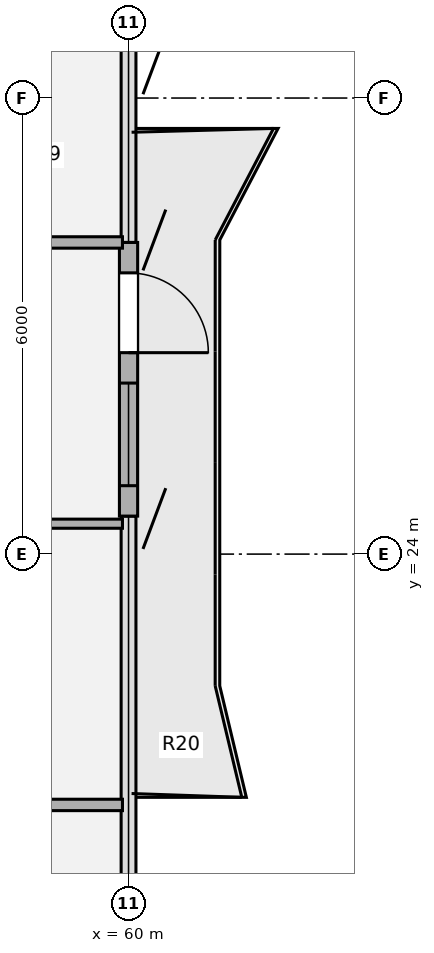
"""IFC4 building model, lengths in metres.
Left out: names, types, materials, properties, quantities, classifications, styles, units other than length and angle.
Written with IfcOpenShell. Run it as: python <this file> out.ifc"""

import sys

from ifc_helpers import new_model, si_unit, direction, frame, frame_2d, origin, origin_2d, place, context, subcontext, project, spatial, rectangle, extrude, source, transform, mapped, element, fill, save


model = new_model("IFC4")
c1 = context("Model", 3, precision=1e-05, world=origin(), true_north=direction((0.0, 1.0)))
c2 = subcontext(c1, "Body", "Model", "MODEL_VIEW")
j1 = project(units=[si_unit("LENGTHUNIT", "METRE"), si_unit("PLANEANGLEUNIT", "RADIAN")], contexts=[c1])
p1 = place(None, origin())
s1 = spatial("IfcSite", under=j1, at=p1, CompositionType="ELEMENT")
p2 = place(p1, origin())
s2 = spatial("IfcBuilding", under=s1, at=p2, CompositionType="ELEMENT")
p3 = place(p2, frame((0.0, 0.0, 34.56)))
s3 = spatial("IfcBuildingStorey", under=s2, at=p3, CompositionType="ELEMENT", Elevation=34.56)
p4 = place(p3, frame((60.0, 28.1, 0.0), z_axis=(0.0, 0.0, 1.0), x_axis=(0.0, -1.0, 0.0)))
e1 = element("IfcWall", 1, at=p4, inside=s3, PredefinedType="SOLIDWALL", context=c2, shape_type="SweptSolid", body=[
    extrude(rectangle(XDim=3.6, YDim=0.24, at=frame_2d((1.8, 0.0))), origin(), (0.0, 0.0, 1.0), 3.53),
])
p5 = place(p4, frame((0.4, 0.0, 0.0)))
e2 = element("IfcOpeningElement", 2, at=p5, cuts=e1, PredefinedType="OPENING", context=c2, shape_type="SweptSolid", body=[
    extrude(rectangle(XDim=1.05, YDim=2.15, at=origin_2d()), frame((0.525, 0.13, 1.075), z_axis=(0.0, -1.0, 0.0), x_axis=(1.0, 0.0, 0.0)), (0.0, 0.0, 1.0), 0.26),
])
p6 = place(p4, frame((1.85, 0.0, 0.85)))
e3 = element("IfcOpeningElement", 3, at=p6, cuts=e1, PredefinedType="OPENING", context=c2, shape_type="SweptSolid", body=[
    extrude(rectangle(XDim=1.35, YDim=1.35, at=origin_2d()), frame((0.675, 0.13, 0.675), z_axis=(0.0, -1.0, 0.0), x_axis=(1.0, 0.0, 0.0)), (0.0, 0.0, 1.0), 0.26),
])
p7 = place(p3, frame((49.9, 20.7, 0.0), z_axis=(0.0, 0.0, 1.0), x_axis=(1.0, 0.0, 0.0)))
e4 = element("IfcWall", 4, at=p7, inside=s3, PredefinedType="PARTITIONING", context=c2, shape_type="SweptSolid", body=[
    extrude(rectangle(XDim=10.02, YDim=0.15, at=frame_2d((5.01, 0.0))), origin(), (0.0, 0.0, 1.0), 2.982),
])
p8 = place(p3, frame((55.936, 24.4, 0.0), z_axis=(0.0, 0.0, 1.0), x_axis=(1.0, 0.0, 0.0)))
e5 = element("IfcWall", 5, at=p8, inside=s3, PredefinedType="PARTITIONING", context=c2, shape_type="SweptSolid", body=[
    extrude(rectangle(XDim=3.984, YDim=0.12, at=frame_2d((1.992, 0.0))), origin(), (0.0, 0.0, 1.0), 2.982),
])
p9 = place(p3, frame((49.9, 28.1, 0.0), z_axis=(0.0, 0.0, 1.0), x_axis=(1.0, 0.0, 0.0)))
e6 = element("IfcWall", 6, at=p9, inside=s3, PredefinedType="PARTITIONING", context=c2, shape_type="SweptSolid", body=[
    extrude(rectangle(XDim=10.02, YDim=0.15, at=frame_2d((5.01, 0.0))), origin(), (0.0, 0.0, 1.0), 2.982),
])
m1 = source(origin(), c2, "Body", "SweptSolid", [
    extrude(rectangle(XDim=1.05, YDim=2.15, at=origin_2d()), frame((0.525, 0.025, 1.075), z_axis=(0.0, -1.0, 0.0), x_axis=(1.0, 0.0, 0.0)), (0.0, 0.0, 1.0), 0.05),
])
p10 = place(p5, origin())
e7 = element("IfcDoor", 7, at=p10, inside=s3, OperationType="SINGLE_SWING_RIGHT", PredefinedType="DOOR", context=c2, shape_type="MappedRepresentation", body=[
    mapped(m1, transform((0.0, 0.0, 0.0), x_axis=(1.0, 0.0, 0.0), y_axis=(0.0, 1.0, 0.0), z_axis=(0.0, 0.0, 1.0), scale=1.0)),
])
fill(e2, e7)
m2 = source(origin(), c2, "Body", "SweptSolid", [
    extrude(rectangle(XDim=1.35, YDim=1.35, at=origin_2d()), frame((0.675, 0.03, 0.675), z_axis=(0.0, -1.0, 0.0), x_axis=(1.0, 0.0, 0.0)), (0.0, 0.0, 1.0), 0.06),
])
p11 = place(p6, origin())
e8 = element("IfcWindow", 8, at=p11, inside=s3, PartitioningType="SINGLE_PANEL", PredefinedType="WINDOW", context=c2, shape_type="MappedRepresentation", body=[
    mapped(m2, transform((0.0, 0.0, 0.0), x_axis=(1.0, 0.0, 0.0), y_axis=(0.0, 1.0, 0.0), z_axis=(0.0, 0.0, 1.0), scale=1.0)),
])
fill(e3, e8)
save(model, sys.argv[1])
